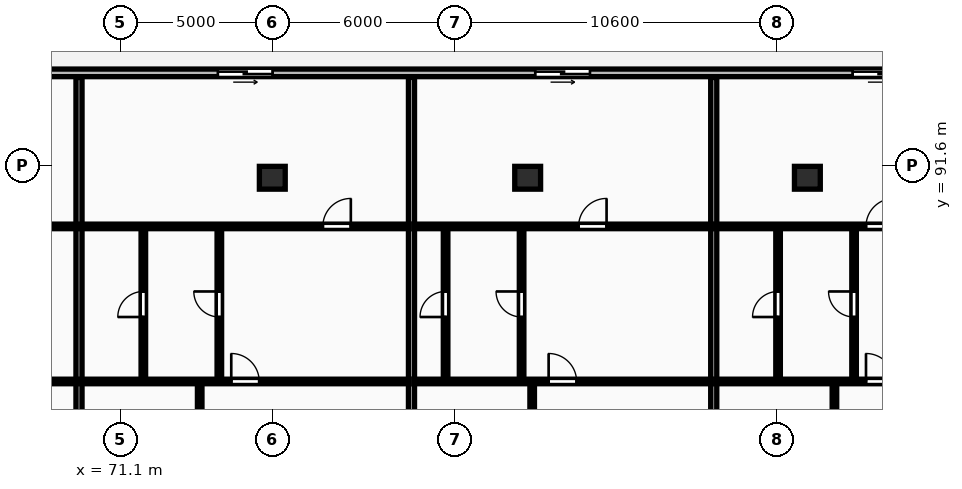
"""IFC4 building model, lengths in metres.
Left out: names, types, materials, properties, quantities, classifications, styles, units other than length and angle.
Written with IfcOpenShell. Run it as: python <this file> out.ifc"""

import sys

from ifc_helpers import new_model, si_unit, direction, frame, frame_2d, origin, origin_2d, place, context, subcontext, project, spatial, rectangle, extrude, element, fill, save


model = new_model("IFC4")
c1 = context("Model", 3, precision=1e-05, world=origin(), true_north=direction((0.0, 1.0)))
c2 = subcontext(c1, "Body", "Model", "MODEL_VIEW")
j1 = project(units=[si_unit("LENGTHUNIT", "METRE"), si_unit("PLANEANGLEUNIT", "RADIAN")], contexts=[c1])
p1 = place(None, origin())
s1 = spatial("IfcSite", under=j1, at=p1, CompositionType="ELEMENT")
p2 = place(p1, origin())
s2 = spatial("IfcBuilding", under=s1, at=p2, CompositionType="ELEMENT")
p3 = place(p2, frame((0.0, 0.0, 204.35)))
s3 = spatial("IfcBuildingStorey", under=s2, at=p3, CompositionType="ELEMENT", Elevation=204.35)
for number, where, z_axis, x_axis in (
    (1, (76.1, 91.2, 0.0), (0.0, 0.0, 1.0), (1.0, 0.0, 0.0)),
    (2, (84.5, 91.2, 0.0), (0.0, 0.0, 1.0), (1.0, 0.0, 0.0)),
    (3, (93.7, 91.2, 0.0), (0.0, 0.0, 1.0), (1.0, 0.0, 0.0)),
):
    element("IfcColumn", number, at=place(p3, frame(where, z_axis=z_axis, x_axis=x_axis)), inside=s3, PredefinedType="COLUMN", context=c2, shape_type="SweptSolid", body=[
        extrude(rectangle(XDim=0.85, YDim=0.75, at=origin_2d()), origin(), (0.0, 0.0, 1.0), 3.25),
    ])
p4 = place(p3, frame((128.4, 94.65, 0.0), z_axis=(0.0, 0.0, 1.0), x_axis=(-1.0, 0.0, 0.0)))
e4 = element("IfcWall", 4, at=p4, inside=s3, PredefinedType="STANDARD", context=c2, shape_type="SweptSolid", body=[
    extrude(rectangle(XDim=68.6, YDim=0.25, at=frame_2d((34.3, 0.0))), origin(), (0.0, 0.0, 1.0), 2.98),
])
p5 = place(p4, frame((62.729, 0.0, 0.0)))
e5 = element("IfcOpeningElement", 5, at=p5, cuts=e4, PredefinedType="OPENING", context=c2, shape_type="SweptSolid", body=[
    extrude(rectangle(XDim=1.8, YDim=2.2, at=frame_2d((0.9, 1.1))), frame((0.0, 0.135, 0.0), z_axis=(0.0, -1.0, 0.0), x_axis=(1.0, 0.0, 0.0)), (0.0, 0.0, 1.0), 0.27),
])
p6 = place(p4, frame((52.29, 0.0, 0.0)))
e6 = element("IfcOpeningElement", 6, at=p6, cuts=e4, PredefinedType="OPENING", context=c2, shape_type="SweptSolid", body=[
    extrude(rectangle(XDim=1.8, YDim=2.2, at=frame_2d((0.9, 1.1))), frame((0.0, 0.135, 0.0), z_axis=(0.0, -1.0, 0.0), x_axis=(1.0, 0.0, 0.0)), (0.0, 0.0, 1.0), 0.27),
])
p7 = place(p4, frame((41.851, 0.0, 0.0)))
e7 = element("IfcOpeningElement", 7, at=p7, cuts=e4, PredefinedType="OPENING", context=c2, shape_type="SweptSolid", body=[
    extrude(rectangle(XDim=1.8, YDim=2.2, at=frame_2d((0.9, 1.1))), frame((0.0, 0.135, 0.0), z_axis=(0.0, -1.0, 0.0), x_axis=(1.0, 0.0, 0.0)), (0.0, 0.0, 1.0), 0.27),
])
p8 = place(p4, frame((31.412, 0.0, 0.0)))
e8 = element("IfcOpeningElement", 8, at=p8, cuts=e4, PredefinedType="OPENING", context=c2, shape_type="SweptSolid", body=[
    extrude(rectangle(XDim=1.8, YDim=2.2, at=frame_2d((0.9, 1.1))), frame((0.0, 0.135, 0.0), z_axis=(0.0, -1.0, 0.0), x_axis=(1.0, 0.0, 0.0)), (0.0, 0.0, 1.0), 0.27),
])
p9 = place(p4, frame((21.552, 0.0, 0.0)))
e9 = element("IfcOpeningElement", 9, at=p9, cuts=e4, PredefinedType="OPENING", context=c2, shape_type="SweptSolid", body=[
    extrude(rectangle(XDim=1.8, YDim=2.2, at=frame_2d((0.9, 1.1))), frame((0.0, 0.135, 0.0), z_axis=(0.0, -1.0, 0.0), x_axis=(1.0, 0.0, 0.0)), (0.0, 0.0, 1.0), 0.27),
])
p10 = place(p4, frame((14.909, 0.0, 0.85)))
e10 = element("IfcOpeningElement", 10, at=p10, cuts=e4, PredefinedType="OPENING", context=c2, shape_type="SweptSolid", body=[
    extrude(rectangle(XDim=2.4, YDim=1.9, at=frame_2d((1.2, 0.95))), frame((0.0, 0.135, 0.0), z_axis=(0.0, -1.0, 0.0), x_axis=(1.0, 0.0, 0.0)), (0.0, 0.0, 1.0), 0.27),
])
p11 = place(p4, frame((7.709, 0.0, 0.0)))
e11 = element("IfcOpeningElement", 11, at=p11, cuts=e4, PredefinedType="OPENING", context=c2, shape_type="SweptSolid", body=[
    extrude(rectangle(XDim=1.8, YDim=2.2, at=frame_2d((0.9, 1.1))), frame((0.0, 0.135, 0.0), z_axis=(0.0, -1.0, 0.0), x_axis=(1.0, 0.0, 0.0)), (0.0, 0.0, 1.0), 0.27),
])
p12 = place(p4, frame((0.87, 0.0, 0.85)))
e12 = element("IfcOpeningElement", 12, at=p12, cuts=e4, PredefinedType="OPENING", context=c2, shape_type="SweptSolid", body=[
    extrude(rectangle(XDim=1.8, YDim=1.8, at=frame_2d((0.9, 0.9))), frame((0.0, 0.135, 0.0), z_axis=(0.0, -1.0, 0.0), x_axis=(1.0, 0.0, 0.0)), (0.0, 0.0, 1.0), 0.27),
])
p13 = place(p3, frame((69.742, 70.18, 0.0), z_axis=(0.0, 0.0, 1.0), x_axis=(0.0, 1.0, 0.0)))
e13 = element("IfcWall", 13, at=p13, inside=s3, PredefinedType="PARTITIONING", context=c2, shape_type="SweptSolid", body=[
    extrude(rectangle(XDim=24.32, YDim=0.2, at=frame_2d((12.16, 0.0))), origin(), (0.0, 0.0, 1.0), 2.98),
])
p14 = place(p3, frame((59.88, 84.5, 0.0), z_axis=(0.0, 0.0, 1.0), x_axis=(1.0, 0.0, 0.0)))
e14 = element("IfcWall", 14, at=p14, inside=s3, PredefinedType="PARTITIONING", context=c2, shape_type="SweptSolid", body=[
    extrude(rectangle(XDim=9.782, YDim=0.15, at=frame_2d((4.891, 0.0))), origin(), (0.0, 0.0, 1.0), 2.98),
])
p15 = place(p14, frame((4.431, 0.0, 0.0)))
e15 = element("IfcOpeningElement", 15, at=p15, cuts=e14, PredefinedType="OPENING", context=c2, shape_type="SweptSolid", body=[
    extrude(rectangle(XDim=0.92, YDim=2.08, at=frame_2d((0.46, 1.04))), frame((0.0, 0.085, 0.0), z_axis=(0.0, -1.0, 0.0), x_axis=(1.0, 0.0, 0.0)), (0.0, 0.0, 1.0), 0.17),
])
p16 = place(p3, frame((59.88, 89.6, 0.0), z_axis=(0.0, 0.0, 1.0), x_axis=(1.0, 0.0, 0.0)))
e16 = element("IfcWall", 16, at=p16, inside=s3, PredefinedType="PARTITIONING", context=c2, shape_type="SweptSolid", body=[
    extrude(rectangle(XDim=9.782, YDim=0.15, at=frame_2d((4.891, 0.0))), origin(), (0.0, 0.0, 1.0), 2.98),
])
p17 = place(p16, frame((4.431, 0.0, 0.0)))
e17 = element("IfcOpeningElement", 17, at=p17, cuts=e16, PredefinedType="OPENING", context=c2, shape_type="SweptSolid", body=[
    extrude(rectangle(XDim=0.92, YDim=2.08, at=frame_2d((0.46, 1.04))), frame((0.0, 0.085, 0.0), z_axis=(0.0, -1.0, 0.0), x_axis=(1.0, 0.0, 0.0)), (0.0, 0.0, 1.0), 0.17),
])
p18 = place(p3, frame((80.678, 70.18, 0.0), z_axis=(0.0, 0.0, 1.0), x_axis=(0.0, 1.0, 0.0)))
e18 = element("IfcWall", 18, at=p18, inside=s3, PredefinedType="PARTITIONING", context=c2, shape_type="SweptSolid", body=[
    extrude(rectangle(XDim=24.32, YDim=0.2, at=frame_2d((12.16, 0.0))), origin(), (0.0, 0.0, 1.0), 2.98),
])
p19 = place(p3, frame((73.712, 70.16, 0.0), z_axis=(0.0, 0.0, 1.0), x_axis=(0.0, 1.0, 0.0)))
e19 = element("IfcWall", 19, at=p19, inside=s3, PredefinedType="PARTITIONING", context=c2, shape_type="SweptSolid", body=[
    extrude(rectangle(XDim=14.3, YDim=0.15, at=frame_2d((7.15, 0.0))), origin(), (0.0, 0.0, 1.0), 2.98),
])
p20 = place(p19, frame((6.2, 0.0, 0.0)))
e20 = element("IfcOpeningElement", 20, at=p20, cuts=e19, PredefinedType="OPENING", context=c2, shape_type="SweptSolid", body=[
    extrude(rectangle(XDim=0.88, YDim=2.06, at=frame_2d((0.44, 1.03))), frame((0.0, 0.085, 0.0), z_axis=(0.0, -1.0, 0.0), x_axis=(1.0, 0.0, 0.0)), (0.0, 0.0, 1.0), 0.17),
])
p21 = place(p3, frame((71.858, 84.54, 0.0), z_axis=(0.0, 0.0, 1.0), x_axis=(0.0, 1.0, 0.0)))
e21 = element("IfcWall", 21, at=p21, inside=s3, PredefinedType="PARTITIONING", context=c2, shape_type="SweptSolid", body=[
    extrude(rectangle(XDim=5.0, YDim=0.15, at=frame_2d((2.5, 0.0))), origin(), (0.0, 0.0, 1.0), 2.98),
])
p22 = place(p21, frame((2.08, 0.0, 0.0)))
e22 = element("IfcOpeningElement", 22, at=p22, cuts=e21, PredefinedType="OPENING", context=c2, shape_type="SweptSolid", body=[
    extrude(rectangle(XDim=0.84, YDim=2.04, at=frame_2d((0.42, 1.02))), frame((0.0, 0.085, 0.0), z_axis=(0.0, -1.0, 0.0), x_axis=(1.0, 0.0, 0.0)), (0.0, 0.0, 1.0), 0.17),
])
p23 = place(p3, frame((74.358, 84.54, 0.0), z_axis=(0.0, 0.0, 1.0), x_axis=(0.0, 1.0, 0.0)))
e23 = element("IfcWall", 23, at=p23, inside=s3, PredefinedType="PARTITIONING", context=c2, shape_type="SweptSolid", body=[
    extrude(rectangle(XDim=5.0, YDim=0.15, at=frame_2d((2.5, 0.0))), origin(), (0.0, 0.0, 1.0), 2.98),
])
p24 = place(p23, frame((2.08, 0.0, 0.0)))
e24 = element("IfcOpeningElement", 24, at=p24, cuts=e23, PredefinedType="OPENING", context=c2, shape_type="SweptSolid", body=[
    extrude(rectangle(XDim=0.84, YDim=2.04, at=frame_2d((0.42, 1.02))), frame((0.0, 0.085, 0.0), z_axis=(0.0, -1.0, 0.0), x_axis=(1.0, 0.0, 0.0)), (0.0, 0.0, 1.0), 0.17),
])
p25 = place(p3, frame((69.822, 84.5, 0.0), z_axis=(0.0, 0.0, 1.0), x_axis=(1.0, 0.0, 0.0)))
e25 = element("IfcWall", 25, at=p25, inside=s3, PredefinedType="PARTITIONING", context=c2, shape_type="SweptSolid", body=[
    extrude(rectangle(XDim=10.776, YDim=0.15, at=frame_2d((5.388, 0.0))), origin(), (0.0, 0.0, 1.0), 2.98),
])
p26 = place(p25, frame((4.928, 0.0, 0.0)))
e26 = element("IfcOpeningElement", 26, at=p26, cuts=e25, PredefinedType="OPENING", context=c2, shape_type="SweptSolid", body=[
    extrude(rectangle(XDim=0.92, YDim=2.08, at=frame_2d((0.46, 1.04))), frame((0.0, 0.085, 0.0), z_axis=(0.0, -1.0, 0.0), x_axis=(1.0, 0.0, 0.0)), (0.0, 0.0, 1.0), 0.17),
])
p27 = place(p3, frame((69.822, 89.6, 0.0), z_axis=(0.0, 0.0, 1.0), x_axis=(1.0, 0.0, 0.0)))
e27 = element("IfcWall", 27, at=p27, inside=s3, PredefinedType="PARTITIONING", context=c2, shape_type="SweptSolid", body=[
    extrude(rectangle(XDim=10.776, YDim=0.15, at=frame_2d((5.388, 0.0))), origin(), (0.0, 0.0, 1.0), 2.98),
])
p28 = place(p27, frame((7.941, 0.0, 0.0)))
e28 = element("IfcOpeningElement", 28, at=p28, cuts=e27, PredefinedType="OPENING", context=c2, shape_type="SweptSolid", body=[
    extrude(rectangle(XDim=0.92, YDim=2.08, at=frame_2d((0.46, 1.04))), frame((0.0, 0.085, 0.0), z_axis=(0.0, -1.0, 0.0), x_axis=(1.0, 0.0, 0.0)), (0.0, 0.0, 1.0), 0.17),
])
p29 = place(p3, frame((90.62, 70.18, 0.0), z_axis=(0.0, 0.0, 1.0), x_axis=(0.0, 1.0, 0.0)))
e29 = element("IfcWall", 29, at=p29, inside=s3, PredefinedType="PARTITIONING", context=c2, shape_type="SweptSolid", body=[
    extrude(rectangle(XDim=24.32, YDim=0.2, at=frame_2d((12.16, 0.0))), origin(), (0.0, 0.0, 1.0), 2.98),
])
p30 = place(p3, frame((84.648, 70.16, 0.0), z_axis=(0.0, 0.0, 1.0), x_axis=(0.0, 1.0, 0.0)))
e30 = element("IfcWall", 30, at=p30, inside=s3, PredefinedType="PARTITIONING", context=c2, shape_type="SweptSolid", body=[
    extrude(rectangle(XDim=14.3, YDim=0.15, at=frame_2d((7.15, 0.0))), origin(), (0.0, 0.0, 1.0), 2.287),
])
p31 = place(p30, frame((5.84, 0.0, 0.0)))
e31 = element("IfcOpeningElement", 31, at=p31, cuts=e30, PredefinedType="OPENING", context=c2, shape_type="SweptSolid", body=[
    extrude(rectangle(XDim=0.88, YDim=2.06, at=frame_2d((0.44, 1.03))), frame((0.0, 0.085, 0.0), z_axis=(0.0, -1.0, 0.0), x_axis=(1.0, 0.0, 0.0)), (0.0, 0.0, 1.0), 0.17),
])
p32 = place(p3, frame((81.8, 84.54, 0.0), z_axis=(0.0, 0.0, 1.0), x_axis=(0.0, 1.0, 0.0)))
e32 = element("IfcWall", 32, at=p32, inside=s3, PredefinedType="PARTITIONING", context=c2, shape_type="SweptSolid", body=[
    extrude(rectangle(XDim=5.0, YDim=0.15, at=frame_2d((2.5, 0.0))), origin(), (0.0, 0.0, 1.0), 2.98),
])
p33 = place(p32, frame((2.08, 0.0, 0.0)))
e33 = element("IfcOpeningElement", 33, at=p33, cuts=e32, PredefinedType="OPENING", context=c2, shape_type="SweptSolid", body=[
    extrude(rectangle(XDim=0.84, YDim=2.04, at=frame_2d((0.42, 1.02))), frame((0.0, 0.085, 0.0), z_axis=(0.0, -1.0, 0.0), x_axis=(1.0, 0.0, 0.0)), (0.0, 0.0, 1.0), 0.17),
])
p34 = place(p3, frame((84.3, 84.54, 0.0), z_axis=(0.0, 0.0, 1.0), x_axis=(0.0, 1.0, 0.0)))
e34 = element("IfcWall", 34, at=p34, inside=s3, PredefinedType="PARTITIONING", context=c2, shape_type="SweptSolid", body=[
    extrude(rectangle(XDim=5.0, YDim=0.15, at=frame_2d((2.5, 0.0))), origin(), (0.0, 0.0, 1.0), 2.287),
])
p35 = place(p34, frame((2.08, 0.0, 0.0)))
e35 = element("IfcOpeningElement", 35, at=p35, cuts=e34, PredefinedType="OPENING", context=c2, shape_type="SweptSolid", body=[
    extrude(rectangle(XDim=0.84, YDim=2.04, at=frame_2d((0.42, 1.02))), frame((0.0, 0.085, 0.0), z_axis=(0.0, -1.0, 0.0), x_axis=(1.0, 0.0, 0.0)), (0.0, 0.0, 1.0), 0.17),
])
p36 = place(p3, frame((80.758, 84.5, 0.0), z_axis=(0.0, 0.0, 1.0), x_axis=(1.0, 0.0, 0.0)))
e36 = element("IfcWall", 36, at=p36, inside=s3, PredefinedType="PARTITIONING", context=c2, shape_type="SweptSolid", body=[
    extrude(rectangle(XDim=9.782, YDim=0.15, at=frame_2d((4.891, 0.0))), origin(), (0.0, 0.0, 1.0), 2.98),
])
p37 = place(p36, frame((4.431, 0.0, 0.0)))
e37 = element("IfcOpeningElement", 37, at=p37, cuts=e36, PredefinedType="OPENING", context=c2, shape_type="SweptSolid", body=[
    extrude(rectangle(XDim=0.92, YDim=2.08, at=frame_2d((0.46, 1.04))), frame((0.0, 0.085, 0.0), z_axis=(0.0, -1.0, 0.0), x_axis=(1.0, 0.0, 0.0)), (0.0, 0.0, 1.0), 0.17),
])
p38 = place(p3, frame((80.758, 89.6, 0.0), z_axis=(0.0, 0.0, 1.0), x_axis=(1.0, 0.0, 0.0)))
e38 = element("IfcWall", 38, at=p38, inside=s3, PredefinedType="PARTITIONING", context=c2, shape_type="SweptSolid", body=[
    extrude(rectangle(XDim=9.782, YDim=0.15, at=frame_2d((4.891, 0.0))), origin(), (0.0, 0.0, 1.0), 2.98),
])
p39 = place(p38, frame((5.417, 0.0, 0.0)))
e39 = element("IfcOpeningElement", 39, at=p39, cuts=e38, PredefinedType="OPENING", context=c2, shape_type="SweptSolid", body=[
    extrude(rectangle(XDim=0.92, YDim=2.08, at=frame_2d((0.46, 1.04))), frame((0.0, 0.085, 0.0), z_axis=(0.0, -1.0, 0.0), x_axis=(1.0, 0.0, 0.0)), (0.0, 0.0, 1.0), 0.17),
])
p40 = place(p3, frame((94.59, 70.16, 0.0), z_axis=(0.0, 0.0, 1.0), x_axis=(0.0, 1.0, 0.0)))
e40 = element("IfcWall", 40, at=p40, inside=s3, PredefinedType="PARTITIONING", context=c2, shape_type="SweptSolid", body=[
    extrude(rectangle(XDim=14.3, YDim=0.15, at=frame_2d((7.15, 0.0))), origin(), (0.0, 0.0, 1.0), 2.98),
])
p41 = place(p40, frame((6.02, 0.0, 0.0)))
e41 = element("IfcOpeningElement", 41, at=p41, cuts=e40, PredefinedType="OPENING", context=c2, shape_type="SweptSolid", body=[
    extrude(rectangle(XDim=0.88, YDim=2.06, at=frame_2d((0.44, 1.03))), frame((0.0, 0.085, 0.0), z_axis=(0.0, -1.0, 0.0), x_axis=(1.0, 0.0, 0.0)), (0.0, 0.0, 1.0), 0.17),
])
p42 = place(p3, frame((92.736, 84.54, 0.0), z_axis=(0.0, 0.0, 1.0), x_axis=(0.0, 1.0, 0.0)))
e42 = element("IfcWall", 42, at=p42, inside=s3, PredefinedType="PARTITIONING", context=c2, shape_type="SweptSolid", body=[
    extrude(rectangle(XDim=5.0, YDim=0.15, at=frame_2d((2.5, 0.0))), origin(), (0.0, 0.0, 1.0), 2.98),
])
p43 = place(p42, frame((2.08, 0.0, 0.0)))
e43 = element("IfcOpeningElement", 43, at=p43, cuts=e42, PredefinedType="OPENING", context=c2, shape_type="SweptSolid", body=[
    extrude(rectangle(XDim=0.84, YDim=2.04, at=frame_2d((0.42, 1.02))), frame((0.0, 0.085, 0.0), z_axis=(0.0, -1.0, 0.0), x_axis=(1.0, 0.0, 0.0)), (0.0, 0.0, 1.0), 0.17),
])
p44 = place(p3, frame((95.236, 84.54, 0.0), z_axis=(0.0, 0.0, 1.0), x_axis=(0.0, 1.0, 0.0)))
e44 = element("IfcWall", 44, at=p44, inside=s3, PredefinedType="PARTITIONING", context=c2, shape_type="SweptSolid", body=[
    extrude(rectangle(XDim=5.0, YDim=0.15, at=frame_2d((2.5, 0.0))), origin(), (0.0, 0.0, 1.0), 2.98),
])
p45 = place(p44, frame((2.08, 0.0, 0.0)))
e45 = element("IfcOpeningElement", 45, at=p45, cuts=e44, PredefinedType="OPENING", context=c2, shape_type="SweptSolid", body=[
    extrude(rectangle(XDim=0.84, YDim=2.04, at=frame_2d((0.42, 1.02))), frame((0.0, 0.085, 0.0), z_axis=(0.0, -1.0, 0.0), x_axis=(1.0, 0.0, 0.0)), (0.0, 0.0, 1.0), 0.17),
])
p46 = place(p3, frame((90.7, 84.5, 0.0), z_axis=(0.0, 0.0, 1.0), x_axis=(1.0, 0.0, 0.0)))
e46 = element("IfcWall", 46, at=p46, inside=s3, PredefinedType="PARTITIONING", context=c2, shape_type="SweptSolid", body=[
    extrude(rectangle(XDim=10.776, YDim=0.15, at=frame_2d((5.388, 0.0))), origin(), (0.0, 0.0, 1.0), 2.98),
])
p47 = place(p46, frame((4.928, 0.0, 0.0)))
e47 = element("IfcOpeningElement", 47, at=p47, cuts=e46, PredefinedType="OPENING", context=c2, shape_type="SweptSolid", body=[
    extrude(rectangle(XDim=0.92, YDim=2.08, at=frame_2d((0.46, 1.04))), frame((0.0, 0.085, 0.0), z_axis=(0.0, -1.0, 0.0), x_axis=(1.0, 0.0, 0.0)), (0.0, 0.0, 1.0), 0.17),
])
p48 = place(p3, frame((90.7, 89.6, 0.0), z_axis=(0.0, 0.0, 1.0), x_axis=(1.0, 0.0, 0.0)))
e48 = element("IfcWall", 48, at=p48, inside=s3, PredefinedType="PARTITIONING", context=c2, shape_type="SweptSolid", body=[
    extrude(rectangle(XDim=10.776, YDim=0.15, at=frame_2d((5.388, 0.0))), origin(), (0.0, 0.0, 1.0), 2.98),
])
p49 = place(p48, frame((4.928, 0.0, 0.0)))
e49 = element("IfcOpeningElement", 49, at=p49, cuts=e48, PredefinedType="OPENING", context=c2, shape_type="SweptSolid", body=[
    extrude(rectangle(XDim=0.92, YDim=2.08, at=frame_2d((0.46, 1.04))), frame((0.0, 0.085, 0.0), z_axis=(0.0, -1.0, 0.0), x_axis=(1.0, 0.0, 0.0)), (0.0, 0.0, 1.0), 0.17),
])
p50 = place(p6, origin())
e50 = element("IfcDoor", 50, at=p50, inside=s3, OperationType="SLIDING_TO_LEFT", PredefinedType="DOOR", context=c2, shape_type="SweptSolid", body=[
    extrude(rectangle(XDim=1.8, YDim=2.2, at=frame_2d((0.9, 1.1))), frame((0.0, 0.025, 0.0), z_axis=(0.0, -1.0, 0.0), x_axis=(1.0, 0.0, 0.0)), (0.0, 0.0, 1.0), 0.05),
])
fill(e6, e50)
p51 = place(p7, origin())
e51 = element("IfcDoor", 51, at=p51, inside=s3, OperationType="SLIDING_TO_LEFT", PredefinedType="DOOR", context=c2, shape_type="SweptSolid", body=[
    extrude(rectangle(XDim=1.8, YDim=2.2, at=frame_2d((0.9, 1.1))), frame((0.0, 0.025, 0.0), z_axis=(0.0, -1.0, 0.0), x_axis=(1.0, 0.0, 0.0)), (0.0, 0.0, 1.0), 0.05),
])
fill(e7, e51)
p52 = place(p8, origin())
e52 = element("IfcDoor", 52, at=p52, inside=s3, OperationType="SLIDING_TO_LEFT", PredefinedType="DOOR", context=c2, shape_type="SweptSolid", body=[
    extrude(rectangle(XDim=1.8, YDim=2.2, at=frame_2d((0.9, 1.1))), frame((0.0, 0.025, 0.0), z_axis=(0.0, -1.0, 0.0), x_axis=(1.0, 0.0, 0.0)), (0.0, 0.0, 1.0), 0.05),
])
fill(e8, e52)
p53 = place(p22, origin())
e53 = element("IfcDoor", 53, at=p53, inside=s3, OperationType="SINGLE_SWING_LEFT", PredefinedType="DOOR", context=c2, shape_type="SweptSolid", body=[
    extrude(rectangle(XDim=0.84, YDim=2.04, at=frame_2d((0.42, 1.02))), frame((0.0, 0.025, 0.0), z_axis=(0.0, -1.0, 0.0), x_axis=(1.0, 0.0, 0.0)), (0.0, 0.0, 1.0), 0.05),
])
fill(e22, e53)
p54 = place(p24, origin())
e54 = element("IfcDoor", 54, at=p54, inside=s3, OperationType="SINGLE_SWING_RIGHT", PredefinedType="DOOR", context=c2, shape_type="SweptSolid", body=[
    extrude(rectangle(XDim=0.84, YDim=2.04, at=frame_2d((0.42, 1.02))), frame((0.0, 0.025, 0.0), z_axis=(0.0, -1.0, 0.0), x_axis=(1.0, 0.0, 0.0)), (0.0, 0.0, 1.0), 0.05),
])
fill(e24, e54)
p55 = place(p26, origin())
e55 = element("IfcDoor", 55, at=p55, inside=s3, OperationType="SINGLE_SWING_LEFT", PredefinedType="DOOR", context=c2, shape_type="SweptSolid", body=[
    extrude(rectangle(XDim=0.92, YDim=2.08, at=frame_2d((0.46, 1.04))), frame((0.0, 0.025, 0.0), z_axis=(0.0, -1.0, 0.0), x_axis=(1.0, 0.0, 0.0)), (0.0, 0.0, 1.0), 0.05),
])
fill(e26, e55)
p56 = place(p28, origin())
e56 = element("IfcDoor", 56, at=p56, inside=s3, OperationType="SINGLE_SWING_RIGHT", PredefinedType="DOOR", context=c2, shape_type="SweptSolid", body=[
    extrude(rectangle(XDim=0.92, YDim=2.08, at=frame_2d((0.46, 1.04))), frame((0.0, 0.025, 0.0), z_axis=(0.0, -1.0, 0.0), x_axis=(1.0, 0.0, 0.0)), (0.0, 0.0, 1.0), 0.05),
])
fill(e28, e56)
p57 = place(p33, origin())
e57 = element("IfcDoor", 57, at=p57, inside=s3, OperationType="SINGLE_SWING_LEFT", PredefinedType="DOOR", context=c2, shape_type="SweptSolid", body=[
    extrude(rectangle(XDim=0.84, YDim=2.04, at=frame_2d((0.42, 1.02))), frame((0.0, 0.025, 0.0), z_axis=(0.0, -1.0, 0.0), x_axis=(1.0, 0.0, 0.0)), (0.0, 0.0, 1.0), 0.05),
])
fill(e33, e57)
p58 = place(p35, origin())
e58 = element("IfcDoor", 58, at=p58, inside=s3, OperationType="SINGLE_SWING_RIGHT", PredefinedType="DOOR", context=c2, shape_type="SweptSolid", body=[
    extrude(rectangle(XDim=0.84, YDim=2.04, at=frame_2d((0.42, 1.02))), frame((0.0, 0.025, 0.0), z_axis=(0.0, -1.0, 0.0), x_axis=(1.0, 0.0, 0.0)), (0.0, 0.0, 1.0), 0.05),
])
fill(e35, e58)
p59 = place(p37, origin())
e59 = element("IfcDoor", 59, at=p59, inside=s3, OperationType="SINGLE_SWING_LEFT", PredefinedType="DOOR", context=c2, shape_type="SweptSolid", body=[
    extrude(rectangle(XDim=0.92, YDim=2.08, at=frame_2d((0.46, 1.04))), frame((0.0, 0.025, 0.0), z_axis=(0.0, -1.0, 0.0), x_axis=(1.0, 0.0, 0.0)), (0.0, 0.0, 1.0), 0.05),
])
fill(e37, e59)
p60 = place(p39, origin())
e60 = element("IfcDoor", 60, at=p60, inside=s3, OperationType="SINGLE_SWING_RIGHT", PredefinedType="DOOR", context=c2, shape_type="SweptSolid", body=[
    extrude(rectangle(XDim=0.92, YDim=2.08, at=frame_2d((0.46, 1.04))), frame((0.0, 0.025, 0.0), z_axis=(0.0, -1.0, 0.0), x_axis=(1.0, 0.0, 0.0)), (0.0, 0.0, 1.0), 0.05),
])
fill(e39, e60)
p61 = place(p43, origin())
e61 = element("IfcDoor", 61, at=p61, inside=s3, OperationType="SINGLE_SWING_LEFT", PredefinedType="DOOR", context=c2, shape_type="SweptSolid", body=[
    extrude(rectangle(XDim=0.84, YDim=2.04, at=frame_2d((0.42, 1.02))), frame((0.0, 0.025, 0.0), z_axis=(0.0, -1.0, 0.0), x_axis=(1.0, 0.0, 0.0)), (0.0, 0.0, 1.0), 0.05),
])
fill(e43, e61)
p62 = place(p45, origin())
e62 = element("IfcDoor", 62, at=p62, inside=s3, OperationType="SINGLE_SWING_RIGHT", PredefinedType="DOOR", context=c2, shape_type="SweptSolid", body=[
    extrude(rectangle(XDim=0.84, YDim=2.04, at=frame_2d((0.42, 1.02))), frame((0.0, 0.025, 0.0), z_axis=(0.0, -1.0, 0.0), x_axis=(1.0, 0.0, 0.0)), (0.0, 0.0, 1.0), 0.05),
])
fill(e45, e62)
p63 = place(p47, origin())
e63 = element("IfcDoor", 63, at=p63, inside=s3, OperationType="SINGLE_SWING_LEFT", PredefinedType="DOOR", context=c2, shape_type="SweptSolid", body=[
    extrude(rectangle(XDim=0.92, YDim=2.08, at=frame_2d((0.46, 1.04))), frame((0.0, 0.025, 0.0), z_axis=(0.0, -1.0, 0.0), x_axis=(1.0, 0.0, 0.0)), (0.0, 0.0, 1.0), 0.05),
])
fill(e47, e63)
p64 = place(p49, origin())
e64 = element("IfcDoor", 64, at=p64, inside=s3, OperationType="SINGLE_SWING_RIGHT", PredefinedType="DOOR", context=c2, shape_type="SweptSolid", body=[
    extrude(rectangle(XDim=0.92, YDim=2.08, at=frame_2d((0.46, 1.04))), frame((0.0, 0.025, 0.0), z_axis=(0.0, -1.0, 0.0), x_axis=(1.0, 0.0, 0.0)), (0.0, 0.0, 1.0), 0.05),
])
fill(e49, e64)
save(model, sys.argv[1])
